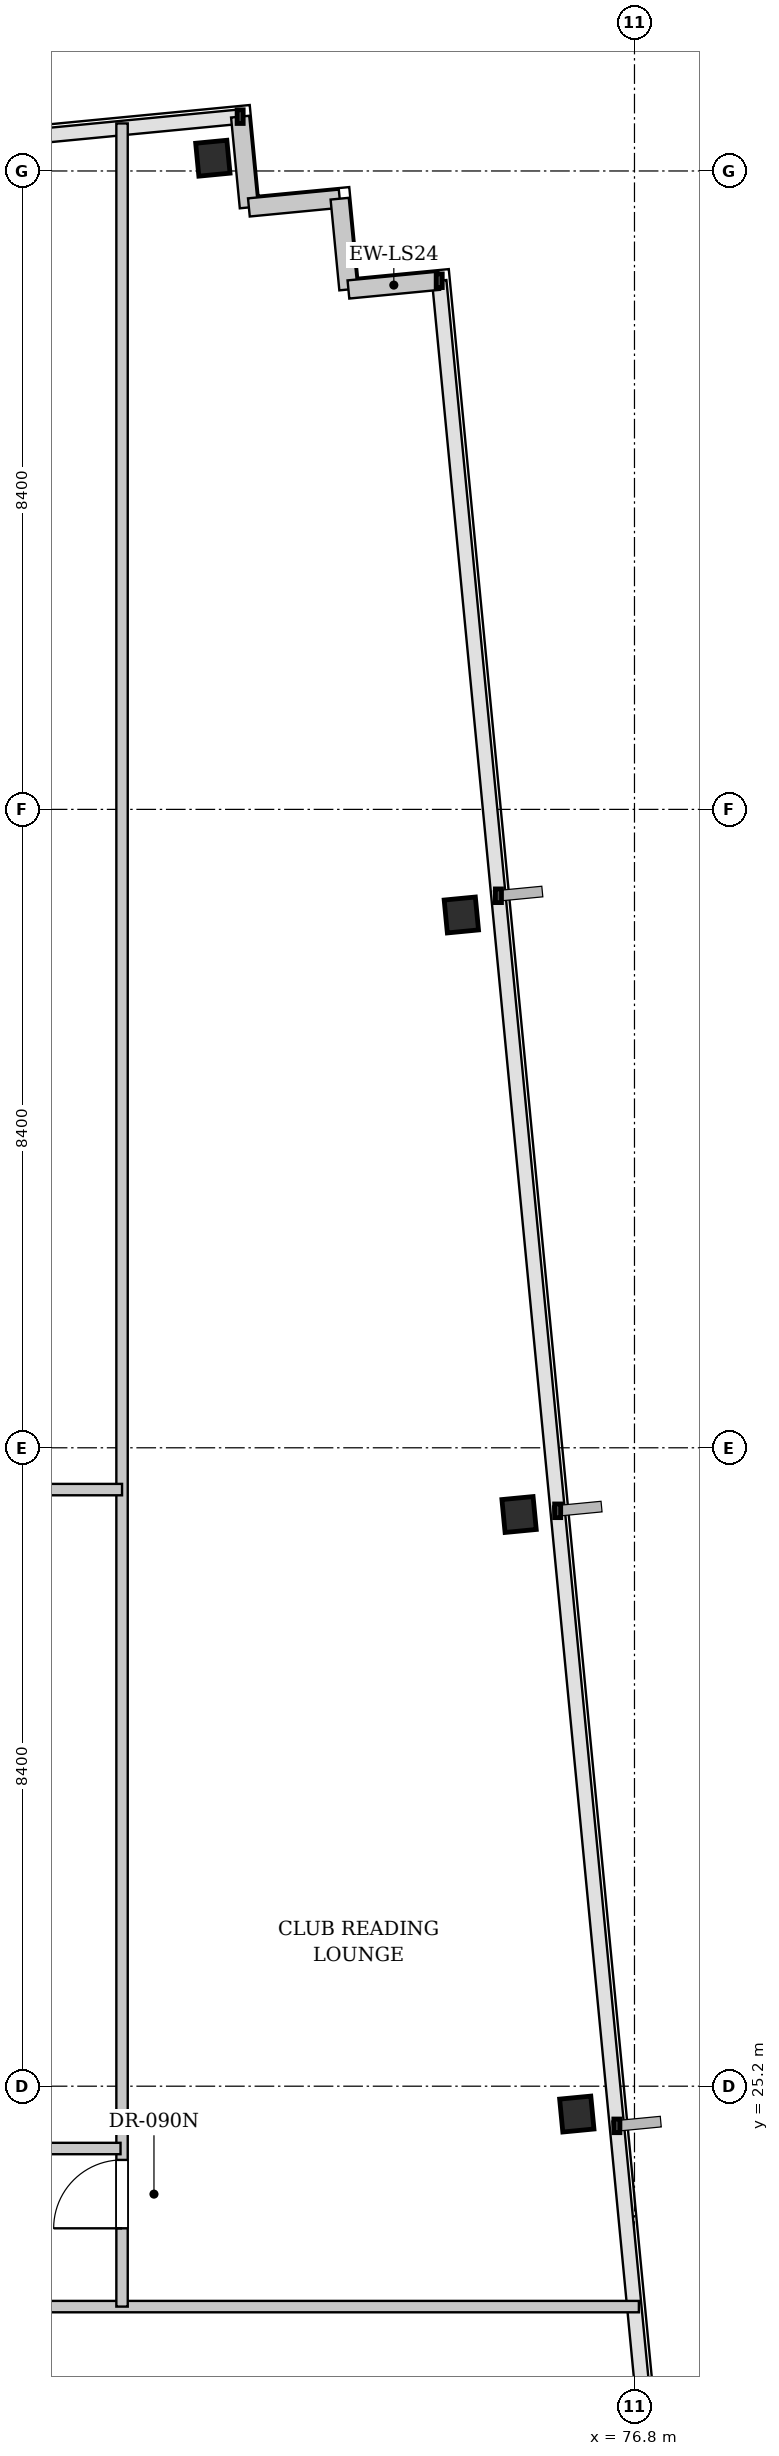
"""IFC4 building model, lengths in metres.
Left out: names, types, materials, properties, quantities, classifications, styles, units other than length and angle.
Written with IfcOpenShell. Run it as: python <this file> out.ifc"""

import sys

from ifc_helpers import new_model, si_unit, direction, frame, frame_2d, origin, origin_2d, place, context, subcontext, project, spatial, rectangle, i_section, extrude, element, fill, save


model = new_model("IFC4")
c1 = context("Model", 3, precision=1e-05, world=origin(), true_north=direction((0.0, 1.0)))
c2 = subcontext(c1, "Body", "Model", "MODEL_VIEW")
j1 = project(units=[si_unit("LENGTHUNIT", "METRE"), si_unit("PLANEANGLEUNIT", "RADIAN")], contexts=[c1])
p1 = place(None, origin())
s1 = spatial("IfcSite", under=j1, at=p1, CompositionType="ELEMENT")
p2 = place(p1, origin())
s2 = spatial("IfcBuilding", under=s1, at=p2, CompositionType="ELEMENT")
p3 = place(p2, frame((0.0, 0.0, 96.5)))
s3 = spatial("IfcBuildingStorey", under=s2, at=p3, CompositionType="ELEMENT", Elevation=96.5)
for number, where, z_axis, x_axis in (
    (1, (71.253, 50.568, 0.0), (0.0, 0.0, 1.0), (0.995, 0.096, 0.0)),
    (2, (76.041, 24.833, 0.0), (0.0, 0.0, 1.0), (0.995, 0.096, 0.0)),
    (3, (75.282, 32.722, 0.0), (0.0, 0.0, 1.0), (0.995, 0.096, 0.0)),
    (4, (74.522, 40.611, 0.0), (0.0, 0.0, 1.0), (0.995, 0.096, 0.0)),
):
    element("IfcColumn", number, at=place(p3, frame(where, z_axis=z_axis, x_axis=x_axis)), inside=s3, PredefinedType="COLUMN", context=c2, shape_type="SweptSolid", body=[
        extrude(i_section(OverallWidth=0.412, OverallDepth=0.435, WebThickness=0.036, FlangeThickness=0.058, FilletRadius=0.015, at=origin_2d()), origin(), (0.0, 0.0, 1.0), 3.4),
    ])
for number, where, z_axis, x_axis in (
    (5, (71.612, 51.115, 0.0), (0.0, 0.0, 1.0), (0.096, -0.995, 0.0)),
    (6, (71.727, 49.92, 0.0), (0.0, 0.0, 1.0), (0.995, 0.096, 0.0)),
    (7, (72.921, 50.035, 0.0), (0.0, 0.0, 1.0), (0.096, -0.995, 0.0)),
    (8, (73.036, 48.841, 0.0), (0.0, 0.0, 1.0), (0.995, 0.096, 0.0)),
):
    element("IfcWall", number, at=place(p3, frame(where, z_axis=z_axis, x_axis=x_axis)), inside=s3, PredefinedType="SOLIDWALL", context=c2, shape_type="SweptSolid", body=[
        extrude(rectangle(XDim=1.2, YDim=0.24, at=frame_2d((0.6, 0.0))), origin(), (0.0, 0.0, 1.0), 3.18),
    ])
p4 = place(p3, frame((15.636, 22.3, 0.0), z_axis=(0.0, 0.0, 1.0), x_axis=(1.0, 0.0, 0.0)))
e9 = element("IfcWall", 9, at=p4, inside=s3, PredefinedType="PARTITIONING", context=c2, shape_type="SweptSolid", body=[
    extrude(rectangle(XDim=61.222, YDim=0.15, at=frame_2d((30.611, 0.0))), origin(), (0.0, 0.0, 1.0), 3.18),
])
p5 = place(p4, frame((11.365, 0.0, 0.0)))
e10 = element("IfcOpeningElement", 10, at=p5, cuts=e9, PredefinedType="OPENING", context=c2, shape_type="SweptSolid", body=[
    extrude(rectangle(XDim=1.0, YDim=2.15, at=frame_2d((0.5, 1.075))), frame((0.0, 0.085, 0.0), z_axis=(0.0, -1.0, 0.0), x_axis=(1.0, 0.0, 0.0)), (0.0, 0.0, 1.0), 0.17),
])
p6 = place(p4, frame((23.917, 0.0, 0.0)))
e11 = element("IfcOpeningElement", 11, at=p6, cuts=e9, PredefinedType="OPENING", context=c2, shape_type="SweptSolid", body=[
    extrude(rectangle(XDim=1.0, YDim=2.15, at=frame_2d((0.5, 1.075))), frame((0.0, 0.085, 0.0), z_axis=(0.0, -1.0, 0.0), x_axis=(1.0, 0.0, 0.0)), (0.0, 0.0, 1.0), 0.17),
])
p7 = place(p4, frame((34.89, 0.0, 0.0)))
e12 = element("IfcOpeningElement", 12, at=p7, cuts=e9, PredefinedType="OPENING", context=c2, shape_type="SweptSolid", body=[
    extrude(rectangle(XDim=1.0, YDim=2.15, at=frame_2d((0.5, 1.075))), frame((0.0, 0.085, 0.0), z_axis=(0.0, -1.0, 0.0), x_axis=(1.0, 0.0, 0.0)), (0.0, 0.0, 1.0), 0.17),
])
p8 = place(p4, frame((47.15, 0.0, 0.0)))
e13 = element("IfcOpeningElement", 13, at=p8, cuts=e9, PredefinedType="OPENING", context=c2, shape_type="SweptSolid", body=[
    extrude(rectangle(XDim=1.0, YDim=2.15, at=frame_2d((0.5, 1.075))), frame((0.0, 0.085, 0.0), z_axis=(0.0, -1.0, 0.0), x_axis=(1.0, 0.0, 0.0)), (0.0, 0.0, 1.0), 0.17),
])
p9 = place(p3, frame((70.058, 22.3, 0.0), z_axis=(0.0, 0.0, 1.0), x_axis=(0.0, 1.0, 0.0)))
e14 = element("IfcWall", 14, at=p9, inside=s3, PredefinedType="PARTITIONING", context=c2, shape_type="SweptSolid", body=[
    extrude(rectangle(XDim=28.726, YDim=0.15, at=frame_2d((14.363, 0.0))), origin(), (0.0, 0.0, 1.0), 3.18),
])
p10 = place(p9, frame((1.03, 0.0, 0.0)))
e15 = element("IfcOpeningElement", 15, at=p10, cuts=e14, PredefinedType="OPENING", context=c2, shape_type="SweptSolid", body=[
    extrude(rectangle(XDim=0.9, YDim=2.15, at=frame_2d((0.45, 1.075))), frame((0.0, 0.085, 0.0), z_axis=(0.0, -1.0, 0.0), x_axis=(1.0, 0.0, 0.0)), (0.0, 0.0, 1.0), 0.17),
])
p11 = place(p3, frame((47.48, 33.05, 0.0), z_axis=(0.0, 0.0, 1.0), x_axis=(1.0, 0.0, 0.0)))
e16 = element("IfcWall", 16, at=p11, inside=s3, PredefinedType="PARTITIONING", context=c2, shape_type="SweptSolid", body=[
    extrude(rectangle(XDim=22.578, YDim=0.15, at=frame_2d((11.289, 0.0))), origin(), (0.0, 0.0, 1.0), 2.525),
])
p12 = place(p3, frame((47.49, 24.38, 0.0), z_axis=(0.0, 0.0, 1.0), x_axis=(1.0, 0.0, 0.0)))
e17 = element("IfcWall", 17, at=p12, inside=s3, PredefinedType="PARTITIONING", context=c2, shape_type="SweptSolid", body=[
    extrude(rectangle(XDim=22.548, YDim=0.15, at=frame_2d((11.274, 0.0))), origin(), (0.0, 0.0, 1.0), 3.18),
])
p13 = place(p12, frame((2.143, 0.0, 0.0)))
e18 = element("IfcOpeningElement", 18, at=p13, cuts=e17, PredefinedType="OPENING", context=c2, shape_type="SweptSolid", body=[
    extrude(rectangle(XDim=0.9, YDim=2.15, at=frame_2d((0.45, 1.075))), frame((0.0, 0.085, 0.0), z_axis=(0.0, -1.0, 0.0), x_axis=(1.0, 0.0, 0.0)), (0.0, 0.0, 1.0), 0.17),
])
p14 = place(p12, frame((11.753, 0.0, 0.0)))
e19 = element("IfcOpeningElement", 19, at=p14, cuts=e17, PredefinedType="OPENING", context=c2, shape_type="SweptSolid", body=[
    extrude(rectangle(XDim=0.9, YDim=2.15, at=frame_2d((0.45, 1.075))), frame((0.0, 0.085, 0.0), z_axis=(0.0, -1.0, 0.0), x_axis=(1.0, 0.0, 0.0)), (0.0, 0.0, 1.0), 0.17),
])
p15 = place(p12, frame((17.476, 0.0, 0.0)))
e20 = element("IfcOpeningElement", 20, at=p15, cuts=e17, PredefinedType="OPENING", context=c2, shape_type="SweptSolid", body=[
    extrude(rectangle(XDim=0.9, YDim=2.15, at=frame_2d((0.45, 1.075))), frame((0.0, 0.085, 0.0), z_axis=(0.0, -1.0, 0.0), x_axis=(1.0, 0.0, 0.0)), (0.0, 0.0, 1.0), 0.17),
])
p16 = place(p10, origin())
e21 = element("IfcDoor", 21, at=p16, inside=s3, OperationType="SINGLE_SWING_LEFT", PredefinedType="DOOR", context=c2, shape_type="SweptSolid", body=[
    extrude(rectangle(XDim=0.9, YDim=2.15, at=frame_2d((0.45, 1.075))), frame((0.0, 0.025, 0.0), z_axis=(0.0, -1.0, 0.0), x_axis=(1.0, 0.0, 0.0)), (0.0, 0.0, 1.0), 0.05),
])
fill(e15, e21)
save(model, sys.argv[1])
